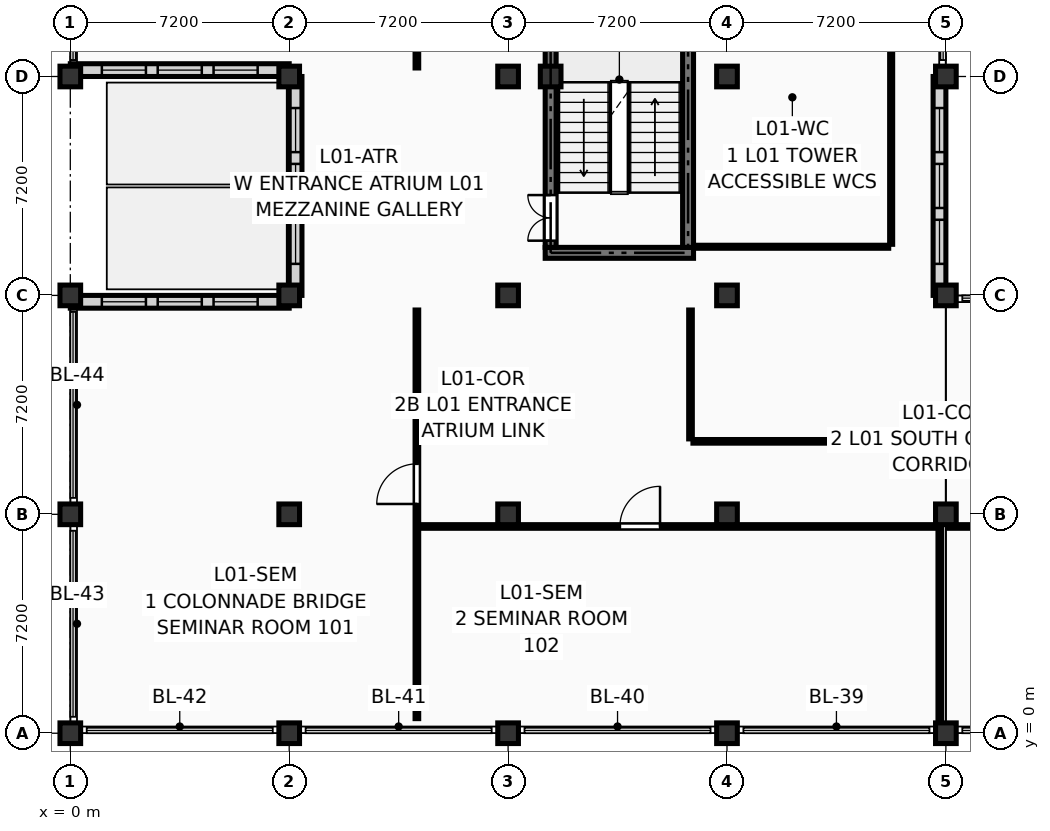
"""IFC4 building model, lengths in metres.
Left out: names, types, materials, properties, quantities, classifications, styles, units other than length and angle.
Written with IfcOpenShell. Run it as: python <this file> out.ifc"""

import sys

from ifc_helpers import new_model, si_unit, direction, frame, frame_2d, origin, origin_2d, place, context, subcontext, project, spatial, rectangle, extrude, element, fill, save


model = new_model("IFC4")
c1 = context("Model", 3, precision=1e-05, world=origin(), true_north=direction((0.0, 1.0)))
c2 = subcontext(c1, "Body", "Model", "MODEL_VIEW")
j1 = project(units=[si_unit("LENGTHUNIT", "METRE"), si_unit("PLANEANGLEUNIT", "RADIAN")], contexts=[c1])
p1 = place(None, origin())
s1 = spatial("IfcSite", under=j1, at=p1, CompositionType="ELEMENT")
p2 = place(p1, origin())
s2 = spatial("IfcBuilding", under=s1, at=p2, CompositionType="ELEMENT")
p3 = place(p2, frame((0.0, 0.0, 4.5)))
s3 = spatial("IfcBuildingStorey", under=s2, at=p3, CompositionType="ELEMENT", Elevation=4.5)
for number, where, z_axis, x_axis in (
    (1, (0.0, 0.0, 0.0), (0.0, 0.0, 1.0), (1.0, 0.0, 0.0)),
    (2, (0.0, 7.2, 0.0), (0.0, 0.0, 1.0), (1.0, 0.0, 0.0)),
    (3, (0.0, 14.4, 0.0), (0.0, 0.0, 1.0), (1.0, 0.0, 0.0)),
    (4, (0.0, 21.6, 0.0), (0.0, 0.0, 1.0), (1.0, 0.0, 0.0)),
    (5, (7.2, 0.0, 0.0), (0.0, 0.0, 1.0), (1.0, 0.0, 0.0)),
    (6, (7.2, 7.2, 0.0), (0.0, 0.0, 1.0), (1.0, 0.0, 0.0)),
    (7, (7.2, 14.4, 0.0), (0.0, 0.0, 1.0), (1.0, 0.0, 0.0)),
    (8, (7.2, 21.6, 0.0), (0.0, 0.0, 1.0), (1.0, 0.0, 0.0)),
    (9, (14.4, 0.0, 0.0), (0.0, 0.0, 1.0), (1.0, 0.0, 0.0)),
    (10, (14.4, 7.2, 0.0), (0.0, 0.0, 1.0), (1.0, 0.0, 0.0)),
    (11, (14.4, 14.4, 0.0), (0.0, 0.0, 1.0), (1.0, 0.0, 0.0)),
    (12, (14.4, 21.6, 0.0), (0.0, 0.0, 1.0), (1.0, 0.0, 0.0)),
    (13, (15.8, 21.6, 0.0), (0.0, 0.0, 1.0), (1.0, 0.0, 0.0)),
    (14, (21.6, 0.0, 0.0), (0.0, 0.0, 1.0), (1.0, 0.0, 0.0)),
    (15, (21.6, 7.2, 0.0), (0.0, 0.0, 1.0), (1.0, 0.0, 0.0)),
    (16, (21.6, 14.4, 0.0), (0.0, 0.0, 1.0), (1.0, 0.0, 0.0)),
    (17, (21.6, 21.6, 0.0), (0.0, 0.0, 1.0), (1.0, 0.0, 0.0)),
    (18, (28.8, 0.0, 0.0), (0.0, 0.0, 1.0), (1.0, 0.0, 0.0)),
    (19, (28.8, 7.2, 0.0), (0.0, 0.0, 1.0), (1.0, 0.0, 0.0)),
    (20, (28.8, 14.4, 0.0), (0.0, 0.0, 1.0), (1.0, 0.0, 0.0)),
    (21, (28.8, 21.6, 0.0), (0.0, 0.0, 1.0), (1.0, 0.0, 0.0)),
):
    element("IfcColumn", number, at=place(p3, frame(where, z_axis=z_axis, x_axis=x_axis)), inside=s3, PredefinedType="COLUMN", context=c2, shape_type="SweptSolid", body=[
        extrude(rectangle(XDim=0.68, YDim=0.68, at=origin_2d()), origin(), (0.0, 0.0, 1.0), 4.05),
    ])
p4 = place(p3, frame((7.41, 14.4, 0.0), z_axis=(0.0, 0.0, 1.0), x_axis=(0.0, 1.0, 0.0)))
e22 = element("IfcWall", 22, at=p4, inside=s3, PredefinedType="SOLIDWALL", context=c2, shape_type="SweptSolid", body=[
    extrude(rectangle(XDim=7.2, YDim=0.42, at=frame_2d((3.6, 0.0))), origin(), (0.0, 0.0, 1.0), 3.16),
])
p5 = place(p4, frame((1.038, 0.0, 0.18)))
e23 = element("IfcOpeningElement", 23, at=p5, cuts=e22, PredefinedType="OPENING", context=c2, shape_type="SweptSolid", body=[
    extrude(rectangle(XDim=1.45, YDim=2.8, at=frame_2d((0.725, 1.4))), frame((0.0, 0.222, 0.0), z_axis=(0.0, -1.0, 0.0), x_axis=(1.0, 0.0, 0.0)), (0.0, 0.0, 1.0), 0.444),
])
p6 = place(p4, frame((2.875, 0.0, 0.18)))
e24 = element("IfcOpeningElement", 24, at=p6, cuts=e22, PredefinedType="OPENING", context=c2, shape_type="SweptSolid", body=[
    extrude(rectangle(XDim=1.45, YDim=2.8, at=frame_2d((0.725, 1.4))), frame((0.0, 0.222, 0.0), z_axis=(0.0, -1.0, 0.0), x_axis=(1.0, 0.0, 0.0)), (0.0, 0.0, 1.0), 0.444),
])
p7 = place(p4, frame((4.712, 0.0, 0.18)))
e25 = element("IfcOpeningElement", 25, at=p7, cuts=e22, PredefinedType="OPENING", context=c2, shape_type="SweptSolid", body=[
    extrude(rectangle(XDim=1.45, YDim=2.8, at=frame_2d((0.725, 1.4))), frame((0.0, 0.222, 0.0), z_axis=(0.0, -1.0, 0.0), x_axis=(1.0, 0.0, 0.0)), (0.0, 0.0, 1.0), 0.444),
])
p8 = place(p3, frame((0.0, 21.81, 0.0), z_axis=(0.0, 0.0, 1.0), x_axis=(1.0, 0.0, 0.0)))
e26 = element("IfcWall", 26, at=p8, inside=s3, PredefinedType="SOLIDWALL", context=c2, shape_type="SweptSolid", body=[
    extrude(rectangle(XDim=7.2, YDim=0.42, at=frame_2d((3.6, 0.0))), origin(), (0.0, 0.0, 1.0), 3.16),
])
p9 = place(p8, frame((1.038, 0.0, 0.18)))
e27 = element("IfcOpeningElement", 27, at=p9, cuts=e26, PredefinedType="OPENING", context=c2, shape_type="SweptSolid", body=[
    extrude(rectangle(XDim=1.45, YDim=2.8, at=frame_2d((0.725, 1.4))), frame((0.0, 0.222, 0.0), z_axis=(0.0, -1.0, 0.0), x_axis=(1.0, 0.0, 0.0)), (0.0, 0.0, 1.0), 0.444),
])
p10 = place(p8, frame((2.875, 0.0, 0.18)))
e28 = element("IfcOpeningElement", 28, at=p10, cuts=e26, PredefinedType="OPENING", context=c2, shape_type="SweptSolid", body=[
    extrude(rectangle(XDim=1.45, YDim=2.8, at=frame_2d((0.725, 1.4))), frame((0.0, 0.222, 0.0), z_axis=(0.0, -1.0, 0.0), x_axis=(1.0, 0.0, 0.0)), (0.0, 0.0, 1.0), 0.444),
])
p11 = place(p8, frame((4.712, 0.0, 0.18)))
e29 = element("IfcOpeningElement", 29, at=p11, cuts=e26, PredefinedType="OPENING", context=c2, shape_type="SweptSolid", body=[
    extrude(rectangle(XDim=1.45, YDim=2.8, at=frame_2d((0.725, 1.4))), frame((0.0, 0.222, 0.0), z_axis=(0.0, -1.0, 0.0), x_axis=(1.0, 0.0, 0.0)), (0.0, 0.0, 1.0), 0.444),
])
p12 = place(p3, frame((28.59, 14.4, 0.0), z_axis=(0.0, 0.0, 1.0), x_axis=(0.0, 1.0, 0.0)))
e30 = element("IfcWall", 30, at=p12, inside=s3, PredefinedType="SOLIDWALL", context=c2, shape_type="SweptSolid", body=[
    extrude(rectangle(XDim=7.2, YDim=0.42, at=frame_2d((3.6, 0.0))), origin(), (0.0, 0.0, 1.0), 3.16),
])
p13 = place(p12, frame((1.038, 0.0, 0.18)))
e31 = element("IfcOpeningElement", 31, at=p13, cuts=e30, PredefinedType="OPENING", context=c2, shape_type="SweptSolid", body=[
    extrude(rectangle(XDim=1.45, YDim=2.8, at=frame_2d((0.725, 1.4))), frame((0.0, 0.222, 0.0), z_axis=(0.0, -1.0, 0.0), x_axis=(1.0, 0.0, 0.0)), (0.0, 0.0, 1.0), 0.444),
])
p14 = place(p12, frame((2.875, 0.0, 0.18)))
e32 = element("IfcOpeningElement", 32, at=p14, cuts=e30, PredefinedType="OPENING", context=c2, shape_type="SweptSolid", body=[
    extrude(rectangle(XDim=1.45, YDim=2.8, at=frame_2d((0.725, 1.4))), frame((0.0, 0.222, 0.0), z_axis=(0.0, -1.0, 0.0), x_axis=(1.0, 0.0, 0.0)), (0.0, 0.0, 1.0), 0.444),
])
p15 = place(p12, frame((4.712, 0.0, 0.18)))
e33 = element("IfcOpeningElement", 33, at=p15, cuts=e30, PredefinedType="OPENING", context=c2, shape_type="SweptSolid", body=[
    extrude(rectangle(XDim=1.45, YDim=2.8, at=frame_2d((0.725, 1.4))), frame((0.0, 0.222, 0.0), z_axis=(0.0, -1.0, 0.0), x_axis=(1.0, 0.0, 0.0)), (0.0, 0.0, 1.0), 0.444),
])
p16 = place(p3, frame((0.0, 14.19, 0.0), z_axis=(0.0, 0.0, 1.0), x_axis=(1.0, 0.0, 0.0)))
e34 = element("IfcWall", 34, at=p16, inside=s3, PredefinedType="SOLIDWALL", context=c2, shape_type="SweptSolid", body=[
    extrude(rectangle(XDim=7.2, YDim=0.42, at=frame_2d((3.6, 0.0))), origin(), (0.0, 0.0, 1.0), 3.16),
])
p17 = place(p16, frame((1.038, 0.0, 0.18)))
e35 = element("IfcOpeningElement", 35, at=p17, cuts=e34, PredefinedType="OPENING", context=c2, shape_type="SweptSolid", body=[
    extrude(rectangle(XDim=1.45, YDim=2.8, at=frame_2d((0.725, 1.4))), frame((0.0, 0.222, 0.0), z_axis=(0.0, -1.0, 0.0), x_axis=(1.0, 0.0, 0.0)), (0.0, 0.0, 1.0), 0.444),
])
p18 = place(p16, frame((2.875, 0.0, 0.18)))
e36 = element("IfcOpeningElement", 36, at=p18, cuts=e34, PredefinedType="OPENING", context=c2, shape_type="SweptSolid", body=[
    extrude(rectangle(XDim=1.45, YDim=2.8, at=frame_2d((0.725, 1.4))), frame((0.0, 0.222, 0.0), z_axis=(0.0, -1.0, 0.0), x_axis=(1.0, 0.0, 0.0)), (0.0, 0.0, 1.0), 0.444),
])
p19 = place(p16, frame((4.712, 0.0, 0.18)))
e37 = element("IfcOpeningElement", 37, at=p19, cuts=e34, PredefinedType="OPENING", context=c2, shape_type="SweptSolid", body=[
    extrude(rectangle(XDim=1.45, YDim=2.8, at=frame_2d((0.725, 1.4))), frame((0.0, 0.222, 0.0), z_axis=(0.0, -1.0, 0.0), x_axis=(1.0, 0.0, 0.0)), (0.0, 0.0, 1.0), 0.444),
])
p20 = place(p3, frame((15.62, 15.8, 0.0), z_axis=(0.0, 0.0, 1.0), x_axis=(1.0, 0.0, 0.0)))
e38 = element("IfcWall", 38, at=p20, inside=s3, PredefinedType="SHEAR", context=c2, shape_type="SweptSolid", body=[
    extrude(rectangle(XDim=4.88, YDim=0.36, at=frame_2d((2.44, 0.0))), origin(), (0.0, 0.0, 1.0), 3.79),
])
p21 = place(p3, frame((15.8, 15.98, 0.0), z_axis=(0.0, 0.0, 1.0), x_axis=(0.0, 1.0, 0.0)))
e39 = element("IfcWall", 39, at=p21, inside=s3, PredefinedType="SHEAR", context=c2, shape_type="SweptSolid", body=[
    extrude(rectangle(XDim=7.64, YDim=0.36, at=frame_2d((3.82, 0.0))), origin(), (0.0, 0.0, 1.0), 3.79),
])
p22 = place(p21, frame((0.22, 0.0, 0.0)))
e40 = element("IfcOpeningElement", 40, at=p22, cuts=e39, PredefinedType="OPENING", context=c2, shape_type="SweptSolid", body=[
    extrude(rectangle(XDim=1.5, YDim=2.2, at=frame_2d((0.75, 1.1))), frame((0.0, 0.192, 0.0), z_axis=(0.0, -1.0, 0.0), x_axis=(1.0, 0.0, 0.0)), (0.0, 0.0, 1.0), 0.384),
])
p23 = place(p3, frame((20.32, 15.98, 0.0), z_axis=(0.0, 0.0, 1.0), x_axis=(0.0, 1.0, 0.0)))
e41 = element("IfcWall", 41, at=p23, inside=s3, PredefinedType="SHEAR", context=c2, shape_type="SweptSolid", body=[
    extrude(rectangle(XDim=7.64, YDim=0.36, at=frame_2d((3.82, 0.0))), origin(), (0.0, 0.0, 1.0), 3.79),
])
p24 = place(p3, frame((11.4, 0.48, 0.0), z_axis=(0.0, 0.0, 1.0), x_axis=(0.0, 1.0, 0.0)))
e42 = element("IfcWall", 42, at=p24, inside=s3, PredefinedType="PARTITIONING", context=c2, shape_type="SweptSolid", body=[
    extrude(rectangle(XDim=13.44, YDim=0.12, at=frame_2d((6.72, 0.0))), origin(), (0.0, 0.0, 1.0), 3.775),
])
p25 = place(p24, frame((7.06, 0.0, 0.0)))
e43 = element("IfcOpeningElement", 43, at=p25, cuts=e42, PredefinedType="OPENING", context=c2, shape_type="SweptSolid", body=[
    extrude(rectangle(XDim=1.32, YDim=2.2, at=frame_2d((0.66, 1.1))), frame((0.0, 0.072, 0.0), z_axis=(0.0, -1.0, 0.0), x_axis=(1.0, 0.0, 0.0)), (0.0, 0.0, 1.0), 0.144),
])
p26 = place(p3, frame((28.6, 0.48, 0.0), z_axis=(0.0, 0.0, 1.0), x_axis=(0.0, 1.0, 0.0)))
e44 = element("IfcWall", 44, at=p26, inside=s3, PredefinedType="PARTITIONING", context=c2, shape_type="SweptSolid", body=[
    extrude(rectangle(XDim=6.24, YDim=0.12, at=frame_2d((3.12, 0.0))), origin(), (0.0, 0.0, 1.0), 2.925),
])
p27 = place(p3, frame((11.5, 6.8, 0.0), z_axis=(0.0, 0.0, 1.0), x_axis=(1.0, 0.0, 0.0)))
e45 = element("IfcWall", 45, at=p27, inside=s3, PredefinedType="PARTITIONING", context=c2, shape_type="SweptSolid", body=[
    extrude(rectangle(XDim=17.02, YDim=0.12, at=frame_2d((8.51, 0.0))), origin(), (0.0, 0.0, 1.0), 3.025),
])
p28 = place(p27, frame((6.578, 0.0, 0.0)))
e46 = element("IfcOpeningElement", 46, at=p28, cuts=e45, PredefinedType="OPENING", context=c2, shape_type="SweptSolid", body=[
    extrude(rectangle(XDim=1.32, YDim=2.2, at=frame_2d((0.66, 1.1))), frame((0.0, 0.072, 0.0), z_axis=(0.0, -1.0, 0.0), x_axis=(1.0, 0.0, 0.0)), (0.0, 0.0, 1.0), 0.144),
])
p29 = place(p3, frame((28.88, 6.8, 0.0), z_axis=(0.0, 0.0, 1.0), x_axis=(1.0, 0.0, 0.0)))
e47 = element("IfcWall", 47, at=p29, inside=s3, PredefinedType="PARTITIONING", context=c2, shape_type="SweptSolid", body=[
    extrude(rectangle(XDim=19.04, YDim=0.12, at=frame_2d((9.52, 0.0))), origin(), (0.0, 0.0, 1.0), 3.025),
])
p30 = place(p29, frame((9.22, 0.0, 0.0)))
e48 = element("IfcOpeningElement", 48, at=p30, cuts=e47, PredefinedType="OPENING", context=c2, shape_type="SweptSolid", body=[
    extrude(rectangle(XDim=1.32, YDim=2.2, at=frame_2d((0.66, 1.1))), frame((0.0, 0.072, 0.0), z_axis=(0.0, -1.0, 0.0), x_axis=(1.0, 0.0, 0.0)), (0.0, 0.0, 1.0), 0.144),
])
p31 = place(p3, frame((20.4, 9.68, 0.0), z_axis=(0.0, 0.0, 1.0), x_axis=(0.0, 1.0, 0.0)))
e49 = element("IfcWall", 49, at=p31, inside=s3, PredefinedType="PARTITIONING", context=c2, shape_type="SweptSolid", body=[
    extrude(rectangle(XDim=4.24, YDim=0.12, at=frame_2d((2.12, 0.0))), origin(), (0.0, 0.0, 1.0), 3.775),
])
p32 = place(p3, frame((20.48, 9.6, 0.0), z_axis=(0.0, 0.0, 1.0), x_axis=(1.0, 0.0, 0.0)))
e50 = element("IfcWall", 50, at=p32, inside=s3, PredefinedType="PARTITIONING", context=c2, shape_type="SweptSolid", body=[
    extrude(rectangle(XDim=44.04, YDim=0.12, at=frame_2d((22.02, 0.0))), origin(), (0.0, 0.0, 1.0), 3.775),
])
p33 = place(p32, frame((20.479, 0.0, 0.0)))
e51 = element("IfcOpeningElement", 51, at=p33, cuts=e50, PredefinedType="OPENING", context=c2, shape_type="SweptSolid", body=[
    extrude(rectangle(XDim=1.32, YDim=2.2, at=frame_2d((0.66, 1.1))), frame((0.0, 0.072, 0.0), z_axis=(0.0, -1.0, 0.0), x_axis=(1.0, 0.0, 0.0)), (0.0, 0.0, 1.0), 0.144),
])
p34 = place(p3, frame((11.4, 21.88, 0.0), z_axis=(0.0, 0.0, 1.0), x_axis=(0.0, 1.0, 0.0)))
e52 = element("IfcWall", 52, at=p34, inside=s3, PredefinedType="PARTITIONING", context=c2, shape_type="SweptSolid", body=[
    extrude(rectangle(XDim=16.44, YDim=0.12, at=frame_2d((8.22, 0.0))), origin(), (0.0, 0.0, 1.0), 3.775),
])
p35 = place(p34, frame((7.56, 0.0, 0.0)))
e53 = element("IfcOpeningElement", 53, at=p35, cuts=e52, PredefinedType="OPENING", context=c2, shape_type="SweptSolid", body=[
    extrude(rectangle(XDim=1.32, YDim=2.2, at=frame_2d((0.66, 1.1))), frame((0.0, 0.072, 0.0), z_axis=(0.0, -1.0, 0.0), x_axis=(1.0, 0.0, 0.0)), (0.0, 0.0, 1.0), 0.144),
])
p36 = place(p3, frame((20.58, 16.0, 0.0), z_axis=(0.0, 0.0, 1.0), x_axis=(1.0, 0.0, 0.0)))
e54 = element("IfcWall", 54, at=p36, inside=s3, PredefinedType="PARTITIONING", context=c2, shape_type="SweptSolid", body=[
    extrude(rectangle(XDim=6.34, YDim=0.1, at=frame_2d((3.17, 0.0))), origin(), (0.0, 0.0, 1.0), 3.775),
])
p37 = place(p3, frame((27.0, 16.08, 0.0), z_axis=(0.0, 0.0, 1.0), x_axis=(0.0, 1.0, 0.0)))
e55 = element("IfcWall", 55, at=p37, inside=s3, PredefinedType="PARTITIONING", context=c2, shape_type="SweptSolid", body=[
    extrude(rectangle(XDim=10.44, YDim=0.1, at=frame_2d((5.22, 0.0))), origin(), (0.0, 0.0, 1.0), 3.775),
])
p38 = place(p5, origin())
e56 = element("IfcWindow", 56, at=p38, inside=s3, PartitioningType="SINGLE_PANEL", PredefinedType="WINDOW", context=c2, shape_type="SweptSolid", body=[
    extrude(rectangle(XDim=1.45, YDim=2.8, at=frame_2d((0.725, 1.4))), frame((0.0, 0.03, 0.0), z_axis=(0.0, -1.0, 0.0), x_axis=(1.0, 0.0, 0.0)), (0.0, 0.0, 1.0), 0.06),
])
fill(e23, e56)
p39 = place(p6, origin())
e57 = element("IfcWindow", 57, at=p39, inside=s3, PartitioningType="SINGLE_PANEL", PredefinedType="WINDOW", context=c2, shape_type="SweptSolid", body=[
    extrude(rectangle(XDim=1.45, YDim=2.8, at=frame_2d((0.725, 1.4))), frame((0.0, 0.03, 0.0), z_axis=(0.0, -1.0, 0.0), x_axis=(1.0, 0.0, 0.0)), (0.0, 0.0, 1.0), 0.06),
])
fill(e24, e57)
p40 = place(p7, origin())
e58 = element("IfcWindow", 58, at=p40, inside=s3, PartitioningType="SINGLE_PANEL", PredefinedType="WINDOW", context=c2, shape_type="SweptSolid", body=[
    extrude(rectangle(XDim=1.45, YDim=2.8, at=frame_2d((0.725, 1.4))), frame((0.0, 0.03, 0.0), z_axis=(0.0, -1.0, 0.0), x_axis=(1.0, 0.0, 0.0)), (0.0, 0.0, 1.0), 0.06),
])
fill(e25, e58)
p41 = place(p9, origin())
e59 = element("IfcWindow", 59, at=p41, inside=s3, PartitioningType="SINGLE_PANEL", PredefinedType="WINDOW", context=c2, shape_type="SweptSolid", body=[
    extrude(rectangle(XDim=1.45, YDim=2.8, at=frame_2d((0.725, 1.4))), frame((0.0, 0.03, 0.0), z_axis=(0.0, -1.0, 0.0), x_axis=(1.0, 0.0, 0.0)), (0.0, 0.0, 1.0), 0.06),
])
fill(e27, e59)
p42 = place(p10, origin())
e60 = element("IfcWindow", 60, at=p42, inside=s3, PartitioningType="SINGLE_PANEL", PredefinedType="WINDOW", context=c2, shape_type="SweptSolid", body=[
    extrude(rectangle(XDim=1.45, YDim=2.8, at=frame_2d((0.725, 1.4))), frame((0.0, 0.03, 0.0), z_axis=(0.0, -1.0, 0.0), x_axis=(1.0, 0.0, 0.0)), (0.0, 0.0, 1.0), 0.06),
])
fill(e28, e60)
p43 = place(p11, origin())
e61 = element("IfcWindow", 61, at=p43, inside=s3, PartitioningType="SINGLE_PANEL", PredefinedType="WINDOW", context=c2, shape_type="SweptSolid", body=[
    extrude(rectangle(XDim=1.45, YDim=2.8, at=frame_2d((0.725, 1.4))), frame((0.0, 0.03, 0.0), z_axis=(0.0, -1.0, 0.0), x_axis=(1.0, 0.0, 0.0)), (0.0, 0.0, 1.0), 0.06),
])
fill(e29, e61)
p44 = place(p13, origin())
e62 = element("IfcWindow", 62, at=p44, inside=s3, PartitioningType="SINGLE_PANEL", PredefinedType="WINDOW", context=c2, shape_type="SweptSolid", body=[
    extrude(rectangle(XDim=1.45, YDim=2.8, at=frame_2d((0.725, 1.4))), frame((0.0, 0.03, 0.0), z_axis=(0.0, -1.0, 0.0), x_axis=(1.0, 0.0, 0.0)), (0.0, 0.0, 1.0), 0.06),
])
fill(e31, e62)
p45 = place(p14, origin())
e63 = element("IfcWindow", 63, at=p45, inside=s3, PartitioningType="SINGLE_PANEL", PredefinedType="WINDOW", context=c2, shape_type="SweptSolid", body=[
    extrude(rectangle(XDim=1.45, YDim=2.8, at=frame_2d((0.725, 1.4))), frame((0.0, 0.03, 0.0), z_axis=(0.0, -1.0, 0.0), x_axis=(1.0, 0.0, 0.0)), (0.0, 0.0, 1.0), 0.06),
])
fill(e32, e63)
p46 = place(p15, origin())
e64 = element("IfcWindow", 64, at=p46, inside=s3, PartitioningType="SINGLE_PANEL", PredefinedType="WINDOW", context=c2, shape_type="SweptSolid", body=[
    extrude(rectangle(XDim=1.45, YDim=2.8, at=frame_2d((0.725, 1.4))), frame((0.0, 0.03, 0.0), z_axis=(0.0, -1.0, 0.0), x_axis=(1.0, 0.0, 0.0)), (0.0, 0.0, 1.0), 0.06),
])
fill(e33, e64)
p47 = place(p17, origin())
e65 = element("IfcWindow", 65, at=p47, inside=s3, PartitioningType="SINGLE_PANEL", PredefinedType="WINDOW", context=c2, shape_type="SweptSolid", body=[
    extrude(rectangle(XDim=1.45, YDim=2.8, at=frame_2d((0.725, 1.4))), frame((0.0, 0.03, 0.0), z_axis=(0.0, -1.0, 0.0), x_axis=(1.0, 0.0, 0.0)), (0.0, 0.0, 1.0), 0.06),
])
fill(e35, e65)
p48 = place(p18, origin())
e66 = element("IfcWindow", 66, at=p48, inside=s3, PartitioningType="SINGLE_PANEL", PredefinedType="WINDOW", context=c2, shape_type="SweptSolid", body=[
    extrude(rectangle(XDim=1.45, YDim=2.8, at=frame_2d((0.725, 1.4))), frame((0.0, 0.03, 0.0), z_axis=(0.0, -1.0, 0.0), x_axis=(1.0, 0.0, 0.0)), (0.0, 0.0, 1.0), 0.06),
])
fill(e36, e66)
p49 = place(p19, origin())
e67 = element("IfcWindow", 67, at=p49, inside=s3, PartitioningType="SINGLE_PANEL", PredefinedType="WINDOW", context=c2, shape_type="SweptSolid", body=[
    extrude(rectangle(XDim=1.45, YDim=2.8, at=frame_2d((0.725, 1.4))), frame((0.0, 0.03, 0.0), z_axis=(0.0, -1.0, 0.0), x_axis=(1.0, 0.0, 0.0)), (0.0, 0.0, 1.0), 0.06),
])
fill(e37, e67)
p50 = place(p22, origin())
e68 = element("IfcDoor", 68, at=p50, inside=s3, OperationType="DOUBLE_DOOR_SINGLE_SWING", PredefinedType="DOOR", context=c2, shape_type="SweptSolid", body=[
    extrude(rectangle(XDim=1.5, YDim=2.2, at=frame_2d((0.75, 1.1))), frame((0.0, 0.025, 0.0), z_axis=(0.0, -1.0, 0.0), x_axis=(1.0, 0.0, 0.0)), (0.0, 0.0, 1.0), 0.05),
])
fill(e40, e68)
p51 = place(p25, origin())
e69 = element("IfcDoor", 69, at=p51, inside=s3, OperationType="SINGLE_SWING_LEFT", PredefinedType="DOOR", context=c2, shape_type="SweptSolid", body=[
    extrude(rectangle(XDim=1.32, YDim=2.2, at=frame_2d((0.66, 1.1))), frame((0.0, 0.025, 0.0), z_axis=(0.0, -1.0, 0.0), x_axis=(1.0, 0.0, 0.0)), (0.0, 0.0, 1.0), 0.05),
])
fill(e43, e69)
p52 = place(p28, origin())
e70 = element("IfcDoor", 70, at=p52, inside=s3, OperationType="SINGLE_SWING_RIGHT", PredefinedType="DOOR", context=c2, shape_type="SweptSolid", body=[
    extrude(rectangle(XDim=1.32, YDim=2.2, at=frame_2d((0.66, 1.1))), frame((0.0, 0.025, 0.0), z_axis=(0.0, -1.0, 0.0), x_axis=(1.0, 0.0, 0.0)), (0.0, 0.0, 1.0), 0.05),
])
fill(e46, e70)
save(model, sys.argv[1])
